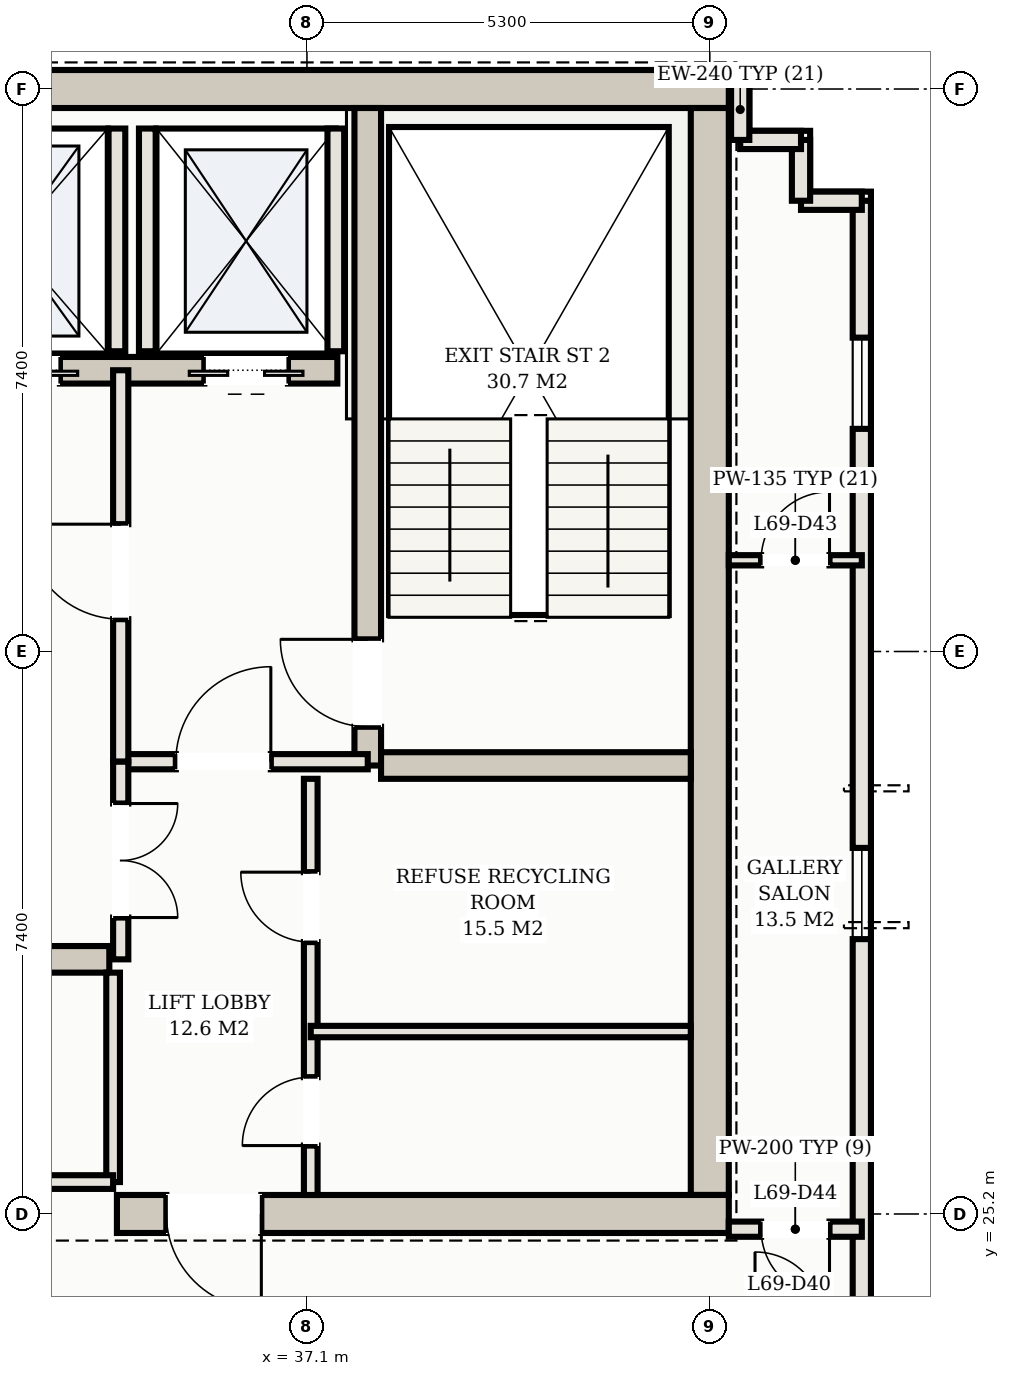
"""IFC4 building model, lengths in metres.
Left out: names, types, materials, properties, quantities, classifications, styles, units other than length and angle.
Written with IfcOpenShell. Run it as: python <this file> out.ifc"""

import sys

from ifc_helpers import new_model, si_unit, direction, frame, frame_2d, origin, place, context, subcontext, project, spatial, rectangle, extrude, element, fill, save


model = new_model("IFC4")
c1 = context("Model", 3, precision=1e-05, world=origin(), true_north=direction((0.0, 1.0)))
c2 = subcontext(c1, "Body", "Model", "MODEL_VIEW")
j1 = project(units=[si_unit("LENGTHUNIT", "METRE"), si_unit("PLANEANGLEUNIT", "RADIAN")], contexts=[c1])
p1 = place(None, origin())
s1 = spatial("IfcSite", under=j1, at=p1, CompositionType="ELEMENT")
p2 = place(p1, origin())
s2 = spatial("IfcBuilding", under=s1, at=p2, CompositionType="ELEMENT")
p3 = place(p2, frame((0.0, 0.0, 249.5)))
s3 = spatial("IfcBuildingStorey", under=s2, at=p3, CompositionType="ELEMENT", Elevation=249.5)
p4 = place(p3, frame((10.35, 40.0, 0.0), z_axis=(0.0, 0.0, 1.0), x_axis=(1.0, 0.0, 0.0)))
e1 = element("IfcWall", 1, at=p4, inside=s3, PredefinedType="SHEAR", context=c2, shape_type="SweptSolid", body=[
    extrude(rectangle(XDim=32.3, YDim=0.5, at=frame_2d((16.15, 0.0))), origin(), (0.0, 0.0, 1.0), 3.11),
])
p5 = place(p3, frame((42.4, 25.45, 0.0), z_axis=(0.0, 0.0, 1.0), x_axis=(0.0, 1.0, 0.0)))
e2 = element("IfcWall", 2, at=p5, inside=s3, PredefinedType="SHEAR", context=c2, shape_type="SweptSolid", body=[
    extrude(rectangle(XDim=14.3, YDim=0.5, at=frame_2d((7.15, 0.0))), origin(), (0.0, 0.0, 1.0), 3.11),
])
p6 = place(p3, frame((34.6, 25.2, 0.0), z_axis=(0.0, 0.0, 1.0), x_axis=(1.0, 0.0, 0.0)))
e3 = element("IfcWall", 3, at=p6, inside=s3, PredefinedType="SHEAR", context=c2, shape_type="SweptSolid", body=[
    extrude(rectangle(XDim=8.05, YDim=0.5, at=frame_2d((4.025, 0.0))), origin(), (0.0, 0.0, 1.0), 3.11),
])
p7 = place(p6, frame((0.65, 0.0, 0.0)))
e4 = element("IfcOpeningElement", 4, at=p7, cuts=e3, PredefinedType="OPENING", context=c2, shape_type="SweptSolid", body=[
    extrude(rectangle(XDim=1.25, YDim=2.2, at=frame_2d((0.625, 1.1))), frame((0.0, 0.26, 0.0), z_axis=(0.0, -1.0, 0.0), x_axis=(1.0, 0.0, 0.0)), (0.0, 0.0, 1.0), 0.52),
])
p8 = place(p3, frame((37.9, 31.1, 0.0), z_axis=(0.0, 0.0, 1.0), x_axis=(0.0, 1.0, 0.0)))
e5 = element("IfcWall", 5, at=p8, inside=s3, PredefinedType="SHEAR", context=c2, shape_type="SweptSolid", body=[
    extrude(rectangle(XDim=8.65, YDim=0.35, at=frame_2d((4.325, 0.0))), origin(), (0.0, 0.0, 1.0), 3.11),
])
p9 = place(p8, frame((0.51, 0.0, 0.0)))
e6 = element("IfcOpeningElement", 6, at=p9, cuts=e5, PredefinedType="OPENING", context=c2, shape_type="SweptSolid", body=[
    extrude(rectangle(XDim=1.15, YDim=2.2, at=frame_2d((0.575, 1.1))), frame((0.0, 0.185, 0.0), z_axis=(0.0, -1.0, 0.0), x_axis=(1.0, 0.0, 0.0)), (0.0, 0.0, 1.0), 0.37),
])
p10 = place(p3, frame((38.075, 31.1, 0.0), z_axis=(0.0, 0.0, 1.0), x_axis=(1.0, 0.0, 0.0)))
e7 = element("IfcWall", 7, at=p10, inside=s3, PredefinedType="SHEAR", context=c2, shape_type="SweptSolid", body=[
    extrude(rectangle(XDim=4.075, YDim=0.35, at=frame_2d((2.038, 0.0))), origin(), (0.0, 0.0, 1.0), 3.11),
])
p11 = place(p3, frame((15.5, 36.3, 0.0), z_axis=(0.0, 0.0, 1.0), x_axis=(1.0, 0.0, 0.0)))
e8 = element("IfcWall", 8, at=p11, inside=s3, PredefinedType="SHEAR", context=c2, shape_type="SweptSolid", body=[
    extrude(rectangle(XDim=22.0, YDim=0.35, at=frame_2d((11.0, 0.0))), origin(), (0.0, 0.0, 1.0), 3.11),
])
p12 = place(p11, frame((0.65, 0.0, 0.0)))
e9 = element("IfcOpeningElement", 9, at=p12, cuts=e8, PredefinedType="OPENING", context=c2, shape_type="SweptSolid", body=[
    extrude(rectangle(XDim=1.1, YDim=2.15, at=frame_2d((0.55, 1.075))), frame((0.0, 0.185, 0.0), z_axis=(0.0, -1.0, 0.0), x_axis=(1.0, 0.0, 0.0)), (0.0, 0.0, 1.0), 0.37),
])
p13 = place(p11, frame((20.25, 0.0, 0.0)))
e10 = element("IfcOpeningElement", 10, at=p13, cuts=e8, PredefinedType="OPENING", context=c2, shape_type="SweptSolid", body=[
    extrude(rectangle(XDim=1.1, YDim=2.15, at=frame_2d((0.55, 1.075))), frame((0.0, 0.185, 0.0), z_axis=(0.0, -1.0, 0.0), x_axis=(1.0, 0.0, 0.0)), (0.0, 0.0, 1.0), 0.37),
])
p14 = place(p11, frame((17.05, 0.0, 0.0)))
e11 = element("IfcOpeningElement", 11, at=p14, cuts=e8, PredefinedType="OPENING", context=c2, shape_type="SweptSolid", body=[
    extrude(rectangle(XDim=1.3, YDim=2.2, at=frame_2d((0.65, 1.1))), frame((0.0, 0.185, 0.0), z_axis=(0.0, -1.0, 0.0), x_axis=(1.0, 0.0, 0.0)), (0.0, 0.0, 1.0), 0.37),
])
p15 = place(p11, frame((3.95, 0.0, 0.0)))
e12 = element("IfcOpeningElement", 12, at=p15, cuts=e8, PredefinedType="OPENING", context=c2, shape_type="SweptSolid", body=[
    extrude(rectangle(XDim=1.1, YDim=2.15, at=frame_2d((0.55, 1.075))), frame((0.0, 0.185, 0.0), z_axis=(0.0, -1.0, 0.0), x_axis=(1.0, 0.0, 0.0)), (0.0, 0.0, 1.0), 0.37),
])
p16 = place(p11, frame((6.55, 0.0, 0.0)))
e13 = element("IfcOpeningElement", 13, at=p16, cuts=e8, PredefinedType="OPENING", context=c2, shape_type="SweptSolid", body=[
    extrude(rectangle(XDim=1.1, YDim=2.15, at=frame_2d((0.55, 1.075))), frame((0.0, 0.185, 0.0), z_axis=(0.0, -1.0, 0.0), x_axis=(1.0, 0.0, 0.0)), (0.0, 0.0, 1.0), 0.37),
])
p17 = place(p11, frame((9.15, 0.0, 0.0)))
e14 = element("IfcOpeningElement", 14, at=p17, cuts=e8, PredefinedType="OPENING", context=c2, shape_type="SweptSolid", body=[
    extrude(rectangle(XDim=1.1, YDim=2.15, at=frame_2d((0.55, 1.075))), frame((0.0, 0.185, 0.0), z_axis=(0.0, -1.0, 0.0), x_axis=(1.0, 0.0, 0.0)), (0.0, 0.0, 1.0), 0.37),
])
p18 = place(p3, frame((18.5, 28.55, 0.0), z_axis=(0.0, 0.0, 1.0), x_axis=(1.0, 0.0, 0.0)))
e15 = element("IfcWall", 15, at=p18, inside=s3, PredefinedType="SHEAR", context=c2, shape_type="SweptSolid", body=[
    extrude(rectangle(XDim=16.0, YDim=0.35, at=frame_2d((8.0, 0.0))), origin(), (0.0, 0.0, 1.0), 3.11),
])
for number, where, z_axis, x_axis in (
    (16, (35.0, 36.55, 0.0), (0.0, 0.0, 1.0), (0.0, 1.0, 0.0)),
    (17, (37.48, 36.55, 0.0), (0.0, 0.0, 1.0), (0.0, 1.0, 0.0)),
    (18, (34.6, 36.55, 0.0), (0.0, 0.0, 1.0), (0.0, 1.0, 0.0)),
):
    element("IfcWall", number, at=place(p3, frame(where, z_axis=z_axis, x_axis=x_axis)), inside=s3, PredefinedType="SOLIDWALL", context=c2, shape_type="SweptSolid", body=[
        extrude(rectangle(XDim=2.93, YDim=0.22, at=frame_2d((1.465, 0.0))), origin(), (0.0, 0.0, 1.0), 3.11),
    ])
p19 = place(p3, frame((44.4, 12.52, 0.0), z_axis=(0.0, 0.0, 1.0), x_axis=(0.0, 1.0, 0.0)))
e19 = element("IfcWall", 19, at=p19, inside=s3, PredefinedType="SOLIDWALL", context=c2, shape_type="SweptSolid", body=[
    extrude(rectangle(XDim=26.01, YDim=0.24, at=frame_2d((13.005, 0.0))), origin(), (0.0, 0.0, 1.0), 3.11),
])
p20 = place(p19, frame((4.48, 0.0, 0.0)))
e20 = element("IfcOpeningElement", 20, at=p20, cuts=e19, PredefinedType="OPENING", context=c2, shape_type="SweptSolid", body=[
    extrude(rectangle(XDim=1.8, YDim=2.2, at=frame_2d((0.9, 1.1))), frame((0.0, 0.13, 0.0), z_axis=(0.0, -1.0, 0.0), x_axis=(1.0, 0.0, 0.0)), (0.0, 0.0, 1.0), 0.26),
])
p21 = place(p19, frame((0.426, 0.0, 0.75)))
e21 = element("IfcOpeningElement", 21, at=p21, cuts=e19, PredefinedType="OPENING", context=c2, shape_type="SweptSolid", body=[
    extrude(rectangle(XDim=1.5, YDim=1.6, at=frame_2d((0.75, 0.8))), frame((0.0, 0.13, 0.0), z_axis=(0.0, -1.0, 0.0), x_axis=(1.0, 0.0, 0.0)), (0.0, 0.0, 1.0), 0.26),
])
p22 = place(p19, frame((2.784, 0.0, 0.75)))
e22 = element("IfcOpeningElement", 22, at=p22, cuts=e19, PredefinedType="OPENING", context=c2, shape_type="SweptSolid", body=[
    extrude(rectangle(XDim=1.2, YDim=1.5, at=frame_2d((0.6, 0.75))), frame((0.0, 0.13, 0.0), z_axis=(0.0, -1.0, 0.0), x_axis=(1.0, 0.0, 0.0)), (0.0, 0.0, 1.0), 0.26),
])
p23 = place(p19, frame((8.16, 0.0, 0.75)))
e23 = element("IfcOpeningElement", 23, at=p23, cuts=e19, PredefinedType="OPENING", context=c2, shape_type="SweptSolid", body=[
    extrude(rectangle(XDim=1.2, YDim=1.5, at=frame_2d((0.6, 0.75))), frame((0.0, 0.13, 0.0), z_axis=(0.0, -1.0, 0.0), x_axis=(1.0, 0.0, 0.0)), (0.0, 0.0, 1.0), 0.26),
])
p24 = place(p19, frame((16.296, 0.0, 0.75)))
e24 = element("IfcOpeningElement", 24, at=p24, cuts=e19, PredefinedType="OPENING", context=c2, shape_type="SweptSolid", body=[
    extrude(rectangle(XDim=1.2, YDim=1.5, at=frame_2d((0.6, 0.75))), frame((0.0, 0.13, 0.0), z_axis=(0.0, -1.0, 0.0), x_axis=(1.0, 0.0, 0.0)), (0.0, 0.0, 1.0), 0.26),
])
p25 = place(p19, frame((23.009, 0.0, 0.75)))
e25 = element("IfcOpeningElement", 25, at=p25, cuts=e19, PredefinedType="OPENING", context=c2, shape_type="SweptSolid", body=[
    extrude(rectangle(XDim=1.2, YDim=1.5, at=frame_2d((0.6, 0.75))), frame((0.0, 0.13, 0.0), z_axis=(0.0, -1.0, 0.0), x_axis=(1.0, 0.0, 0.0)), (0.0, 0.0, 1.0), 0.26),
])
p26 = place(p3, frame((44.4, 38.53, 0.0), z_axis=(0.0, 0.0, 1.0), x_axis=(-1.0, 0.0, 0.0)))
e26 = element("IfcWall", 26, at=p26, inside=s3, PredefinedType="SOLIDWALL", context=c2, shape_type="SweptSolid", body=[
    extrude(rectangle(XDim=0.8, YDim=0.24, at=frame_2d((0.4, 0.0))), origin(), (0.0, 0.0, 1.0), 3.11),
])
for number, where, z_axis, x_axis in (
    (27, (43.6, 38.53, 0.0), (0.0, 0.0, 1.0), (0.0, 1.0, 0.0)),
    (28, (43.6, 39.33, 0.0), (0.0, 0.0, 1.0), (-1.0, 0.0, 0.0)),
):
    element("IfcWall", number, at=place(p3, frame(where, z_axis=z_axis, x_axis=x_axis)), inside=s3, PredefinedType="SOLIDWALL", context=c2, shape_type="SweptSolid", body=[
        extrude(rectangle(XDim=0.8, YDim=0.24, at=frame_2d((0.4, 0.0))), origin(), (0.0, 0.0, 1.0), 3.11),
    ])
p27 = place(p3, frame((42.8, 39.33, 0.0), z_axis=(0.0, 0.0, 1.0), x_axis=(0.0, 1.0, 0.0)))
e29 = element("IfcWall", 29, at=p27, inside=s3, PredefinedType="SOLIDWALL", context=c2, shape_type="SweptSolid", body=[
    extrude(rectangle(XDim=0.8, YDim=0.24, at=frame_2d((0.4, 0.0))), origin(), (0.0, 0.0, 1.0), 3.11),
])
p28 = place(p3, frame((34.65, 31.15, 0.0), z_axis=(0.0, 0.0, 1.0), x_axis=(1.0, 0.0, 0.0)))
e30 = element("IfcWall", 30, at=p28, inside=s3, PredefinedType="PARTITIONING", context=c2, shape_type="SweptSolid", body=[
    extrude(rectangle(XDim=3.25, YDim=0.2, at=frame_2d((1.625, 0.0))), origin(), (0.0, 0.0, 1.0), 2.45),
])
p29 = place(p28, frame((0.725, 0.0, 0.0)))
e31 = element("IfcOpeningElement", 31, at=p29, cuts=e30, PredefinedType="OPENING", context=c2, shape_type="SweptSolid", body=[
    extrude(rectangle(XDim=1.25, YDim=2.2, at=frame_2d((0.625, 1.1))), frame((0.0, 0.11, 0.0), z_axis=(0.0, -1.0, 0.0), x_axis=(1.0, 0.0, 0.0)), (0.0, 0.0, 1.0), 0.22),
])
p30 = place(p3, frame((34.65, 31.15, 0.0), z_axis=(0.0, 0.0, 1.0), x_axis=(0.0, 1.0, 0.0)))
e32 = element("IfcWall", 32, at=p30, inside=s3, PredefinedType="PARTITIONING", context=c2, shape_type="SweptSolid", body=[
    extrude(rectangle(XDim=5.15, YDim=0.2, at=frame_2d((2.575, 0.0))), origin(), (0.0, 0.0, 1.0), 2.45),
])
p31 = place(p30, frame((1.875, 0.0, 0.0)))
e33 = element("IfcOpeningElement", 33, at=p31, cuts=e32, PredefinedType="OPENING", context=c2, shape_type="SweptSolid", body=[
    extrude(rectangle(XDim=1.25, YDim=2.2, at=frame_2d((0.625, 1.1))), frame((0.0, 0.11, 0.0), z_axis=(0.0, -1.0, 0.0), x_axis=(1.0, 0.0, 0.0)), (0.0, 0.0, 1.0), 0.22),
])
p32 = place(p3, frame((37.15, 25.45, 0.0), z_axis=(0.0, 0.0, 1.0), x_axis=(0.0, 1.0, 0.0)))
e34 = element("IfcWall", 34, at=p32, inside=s3, PredefinedType="PARTITIONING", context=c2, shape_type="SweptSolid", body=[
    extrude(rectangle(XDim=5.475, YDim=0.18, at=frame_2d((2.738, 0.0))), origin(), (0.0, 0.0, 1.0), 2.45),
])
p33 = place(p32, frame((0.65, 0.0, 0.0)))
e35 = element("IfcOpeningElement", 35, at=p33, cuts=e34, PredefinedType="OPENING", context=c2, shape_type="SweptSolid", body=[
    extrude(rectangle(XDim=0.9, YDim=2.15, at=frame_2d((0.45, 1.075))), frame((0.0, 0.1, 0.0), z_axis=(0.0, -1.0, 0.0), x_axis=(1.0, 0.0, 0.0)), (0.0, 0.0, 1.0), 0.2),
])
p34 = place(p32, frame((3.327, 0.0, 0.0)))
e36 = element("IfcOpeningElement", 36, at=p34, cuts=e34, PredefinedType="OPENING", context=c2, shape_type="SweptSolid", body=[
    extrude(rectangle(XDim=0.92, YDim=2.15, at=frame_2d((0.46, 1.075))), frame((0.0, 0.1, 0.0), z_axis=(0.0, -1.0, 0.0), x_axis=(1.0, 0.0, 0.0)), (0.0, 0.0, 1.0), 0.2),
])
p35 = place(p3, frame((37.15, 27.6, 0.0), z_axis=(0.0, 0.0, 1.0), x_axis=(1.0, 0.0, 0.0)))
e37 = element("IfcWall", 37, at=p35, inside=s3, PredefinedType="PARTITIONING", context=c2, shape_type="SweptSolid", body=[
    extrude(rectangle(XDim=5.0, YDim=0.15, at=frame_2d((2.5, 0.0))), origin(), (0.0, 0.0, 1.0), 2.45),
])
p36 = place(p3, frame((34.65, 28.55, 0.0), z_axis=(0.0, 0.0, 1.0), x_axis=(0.0, 1.0, 0.0)))
e38 = element("IfcWall", 38, at=p36, inside=s3, PredefinedType="PARTITIONING", context=c2, shape_type="SweptSolid", body=[
    extrude(rectangle(XDim=2.6, YDim=0.2, at=frame_2d((1.3, 0.0))), origin(), (0.0, 0.0, 1.0), 2.45),
])
p37 = place(p36, frame((0.55, 0.0, 0.0)))
e39 = element("IfcOpeningElement", 39, at=p37, cuts=e38, PredefinedType="OPENING", context=c2, shape_type="SweptSolid", body=[
    extrude(rectangle(XDim=1.5, YDim=2.25, at=frame_2d((0.75, 1.125))), frame((0.0, 0.11, 0.0), z_axis=(0.0, -1.0, 0.0), x_axis=(1.0, 0.0, 0.0)), (0.0, 0.0, 1.0), 0.22),
])
p38 = place(p3, frame((34.55, 25.62, 0.0), z_axis=(0.0, 0.0, 1.0), x_axis=(0.0, 1.0, 0.0)))
e40 = element("IfcWall", 40, at=p38, inside=s3, PredefinedType="PARTITIONING", context=c2, shape_type="SweptSolid", body=[
    extrude(rectangle(XDim=2.755, YDim=0.18, at=frame_2d((1.377, 0.0))), origin(), (0.0, 0.0, 1.0), 2.45),
])
p39 = place(p3, frame((26.65, 25.62, 0.0), z_axis=(0.0, 0.0, 1.0), x_axis=(1.0, 0.0, 0.0)))
e41 = element("IfcWall", 41, at=p39, inside=s3, PredefinedType="PARTITIONING", context=c2, shape_type="SweptSolid", body=[
    extrude(rectangle(XDim=7.9, YDim=0.18, at=frame_2d((3.95, 0.0))), origin(), (0.0, 0.0, 1.0), 2.45),
])
p40 = place(p39, frame((3.34, 0.0, 0.0)))
e42 = element("IfcOpeningElement", 42, at=p40, cuts=e41, PredefinedType="OPENING", context=c2, shape_type="SweptSolid", body=[
    extrude(rectangle(XDim=0.92, YDim=2.15, at=frame_2d((0.46, 1.075))), frame((0.0, 0.1, 0.0), z_axis=(0.0, -1.0, 0.0), x_axis=(1.0, 0.0, 0.0)), (0.0, 0.0, 1.0), 0.2),
])
p41 = place(p3, frame((42.65, 25.0, 0.0), z_axis=(0.0, 0.0, 1.0), x_axis=(1.0, 0.0, 0.0)))
e43 = element("IfcWall", 43, at=p41, inside=s3, PredefinedType="PARTITIONING", context=c2, shape_type="SweptSolid", body=[
    extrude(rectangle(XDim=1.75, YDim=0.2, at=frame_2d((0.875, 0.0))), origin(), (0.0, 0.0, 1.0), 2.45),
])
p42 = place(p41, frame((0.425, 0.0, 0.0)))
e44 = element("IfcOpeningElement", 44, at=p42, cuts=e43, PredefinedType="OPENING", context=c2, shape_type="SweptSolid", body=[
    extrude(rectangle(XDim=0.9, YDim=2.15, at=frame_2d((0.45, 1.075))), frame((0.0, 0.11, 0.0), z_axis=(0.0, -1.0, 0.0), x_axis=(1.0, 0.0, 0.0)), (0.0, 0.0, 1.0), 0.22),
])
p43 = place(p3, frame((42.65, 33.8, 0.0), z_axis=(0.0, 0.0, 1.0), x_axis=(1.0, 0.0, 0.0)))
e45 = element("IfcWall", 45, at=p43, inside=s3, PredefinedType="PARTITIONING", context=c2, shape_type="SweptSolid", body=[
    extrude(rectangle(XDim=1.75, YDim=0.135, at=frame_2d((0.875, 0.0))), origin(), (0.0, 0.0, 1.0), 2.45),
])
p44 = place(p43, frame((0.425, 0.0, 0.0)))
e46 = element("IfcOpeningElement", 46, at=p44, cuts=e45, PredefinedType="OPENING", context=c2, shape_type="SweptSolid", body=[
    extrude(rectangle(XDim=0.9, YDim=2.15, at=frame_2d((0.45, 1.075))), frame((0.0, 0.078, 0.0), z_axis=(0.0, -1.0, 0.0), x_axis=(1.0, 0.0, 0.0)), (0.0, 0.0, 1.0), 0.155),
])
p45 = place(p13, frame((1.1, 0.0, 0.0), z_axis=(0.0, 0.0, 1.0), x_axis=(-1.0, 0.0, 0.0)))
e47 = element("IfcDoor", 47, at=p45, inside=s3, OperationType="DOUBLE_DOOR_SLIDING", PredefinedType="DOOR", context=c2, shape_type="SweptSolid", body=[
    extrude(rectangle(XDim=1.1, YDim=2.15, at=frame_2d((0.55, 1.075))), frame((0.0, 0.025, 0.0), z_axis=(0.0, -1.0, 0.0), x_axis=(1.0, 0.0, 0.0)), (0.0, 0.0, 1.0), 0.05),
])
fill(e10, e47)
p46 = place(p14, frame((1.3, 0.0, 0.0), z_axis=(0.0, 0.0, 1.0), x_axis=(-1.0, 0.0, 0.0)))
e48 = element("IfcDoor", 48, at=p46, inside=s3, OperationType="DOUBLE_DOOR_SLIDING", PredefinedType="DOOR", context=c2, shape_type="SweptSolid", body=[
    extrude(rectangle(XDim=1.3, YDim=2.2, at=frame_2d((0.65, 1.1))), frame((0.0, 0.025, 0.0), z_axis=(0.0, -1.0, 0.0), x_axis=(1.0, 0.0, 0.0)), (0.0, 0.0, 1.0), 0.05),
])
fill(e11, e48)
p47 = place(p7, frame((1.25, 0.0, 0.0), z_axis=(0.0, 0.0, 1.0), x_axis=(-1.0, 0.0, 0.0)))
e49 = element("IfcDoor", 49, at=p47, inside=s3, OperationType="SINGLE_SWING_LEFT", PredefinedType="DOOR", context=c2, shape_type="SweptSolid", body=[
    extrude(rectangle(XDim=1.25, YDim=2.2, at=frame_2d((0.625, 1.1))), frame((0.0, 0.025, 0.0), z_axis=(0.0, -1.0, 0.0), x_axis=(1.0, 0.0, 0.0)), (0.0, 0.0, 1.0), 0.05),
])
fill(e4, e49)
p48 = place(p29, origin())
e50 = element("IfcDoor", 50, at=p48, inside=s3, OperationType="SINGLE_SWING_RIGHT", PredefinedType="DOOR", context=c2, shape_type="SweptSolid", body=[
    extrude(rectangle(XDim=1.25, YDim=2.2, at=frame_2d((0.625, 1.1))), frame((0.0, 0.025, 0.0), z_axis=(0.0, -1.0, 0.0), x_axis=(1.0, 0.0, 0.0)), (0.0, 0.0, 1.0), 0.05),
])
fill(e31, e50)
p49 = place(p31, origin())
e51 = element("IfcDoor", 51, at=p49, inside=s3, OperationType="SINGLE_SWING_RIGHT", PredefinedType="DOOR", context=c2, shape_type="SweptSolid", body=[
    extrude(rectangle(XDim=1.25, YDim=2.2, at=frame_2d((0.625, 1.1))), frame((0.0, 0.025, 0.0), z_axis=(0.0, -1.0, 0.0), x_axis=(1.0, 0.0, 0.0)), (0.0, 0.0, 1.0), 0.05),
])
fill(e33, e51)
p50 = place(p9, origin())
e52 = element("IfcDoor", 52, at=p50, inside=s3, OperationType="SINGLE_SWING_RIGHT", PredefinedType="DOOR", context=c2, shape_type="SweptSolid", body=[
    extrude(rectangle(XDim=1.15, YDim=2.2, at=frame_2d((0.575, 1.1))), frame((0.0, 0.025, 0.0), z_axis=(0.0, -1.0, 0.0), x_axis=(1.0, 0.0, 0.0)), (0.0, 0.0, 1.0), 0.05),
])
fill(e6, e52)
p51 = place(p33, origin())
e53 = element("IfcDoor", 53, at=p51, inside=s3, OperationType="SINGLE_SWING_LEFT", PredefinedType="DOOR", context=c2, shape_type="SweptSolid", body=[
    extrude(rectangle(XDim=0.9, YDim=2.15, at=frame_2d((0.45, 1.075))), frame((0.0, 0.025, 0.0), z_axis=(0.0, -1.0, 0.0), x_axis=(1.0, 0.0, 0.0)), (0.0, 0.0, 1.0), 0.05),
])
fill(e35, e53)
p52 = place(p34, origin())
e54 = element("IfcDoor", 54, at=p52, inside=s3, OperationType="SINGLE_SWING_RIGHT", PredefinedType="DOOR", context=c2, shape_type="SweptSolid", body=[
    extrude(rectangle(XDim=0.92, YDim=2.15, at=frame_2d((0.46, 1.075))), frame((0.0, 0.025, 0.0), z_axis=(0.0, -1.0, 0.0), x_axis=(1.0, 0.0, 0.0)), (0.0, 0.0, 1.0), 0.05),
])
fill(e36, e54)
p53 = place(p37, frame((1.5, 0.0, 0.0), z_axis=(0.0, 0.0, 1.0), x_axis=(-1.0, 0.0, 0.0)))
e55 = element("IfcDoor", 55, at=p53, inside=s3, OperationType="DOUBLE_DOOR_SINGLE_SWING", PredefinedType="DOOR", context=c2, shape_type="SweptSolid", body=[
    extrude(rectangle(XDim=1.5, YDim=2.25, at=frame_2d((0.75, 1.125))), frame((0.0, 0.025, 0.0), z_axis=(0.0, -1.0, 0.0), x_axis=(1.0, 0.0, 0.0)), (0.0, 0.0, 1.0), 0.05),
])
fill(e39, e55)
p54 = place(p44, origin())
e56 = element("IfcDoor", 56, at=p54, inside=s3, OperationType="SINGLE_SWING_RIGHT", PredefinedType="DOOR", context=c2, shape_type="SweptSolid", body=[
    extrude(rectangle(XDim=0.9, YDim=2.15, at=frame_2d((0.45, 1.075))), frame((0.0, 0.025, 0.0), z_axis=(0.0, -1.0, 0.0), x_axis=(1.0, 0.0, 0.0)), (0.0, 0.0, 1.0), 0.05),
])
fill(e46, e56)
p55 = place(p42, frame((0.9, 0.0, 0.0), z_axis=(0.0, 0.0, 1.0), x_axis=(-1.0, 0.0, 0.0)))
e57 = element("IfcDoor", 57, at=p55, inside=s3, OperationType="SINGLE_SWING_LEFT", PredefinedType="DOOR", context=c2, shape_type="SweptSolid", body=[
    extrude(rectangle(XDim=0.9, YDim=2.15, at=frame_2d((0.45, 1.075))), frame((0.0, 0.025, 0.0), z_axis=(0.0, -1.0, 0.0), x_axis=(1.0, 0.0, 0.0)), (0.0, 0.0, 1.0), 0.05),
])
fill(e44, e57)
p56 = place(p24, origin())
e58 = element("IfcWindow", 58, at=p56, inside=s3, PartitioningType="SINGLE_PANEL", PredefinedType="WINDOW", context=c2, shape_type="SweptSolid", body=[
    extrude(rectangle(XDim=1.2, YDim=1.5, at=frame_2d((0.6, 0.75))), frame((0.0, 0.03, 0.0), z_axis=(0.0, -1.0, 0.0), x_axis=(1.0, 0.0, 0.0)), (0.0, 0.0, 1.0), 0.06),
])
fill(e24, e58)
p57 = place(p25, origin())
e59 = element("IfcWindow", 59, at=p57, inside=s3, PartitioningType="SINGLE_PANEL", PredefinedType="WINDOW", context=c2, shape_type="SweptSolid", body=[
    extrude(rectangle(XDim=1.2, YDim=1.5, at=frame_2d((0.6, 0.75))), frame((0.0, 0.03, 0.0), z_axis=(0.0, -1.0, 0.0), x_axis=(1.0, 0.0, 0.0)), (0.0, 0.0, 1.0), 0.06),
])
fill(e25, e59)
save(model, sys.argv[1])
